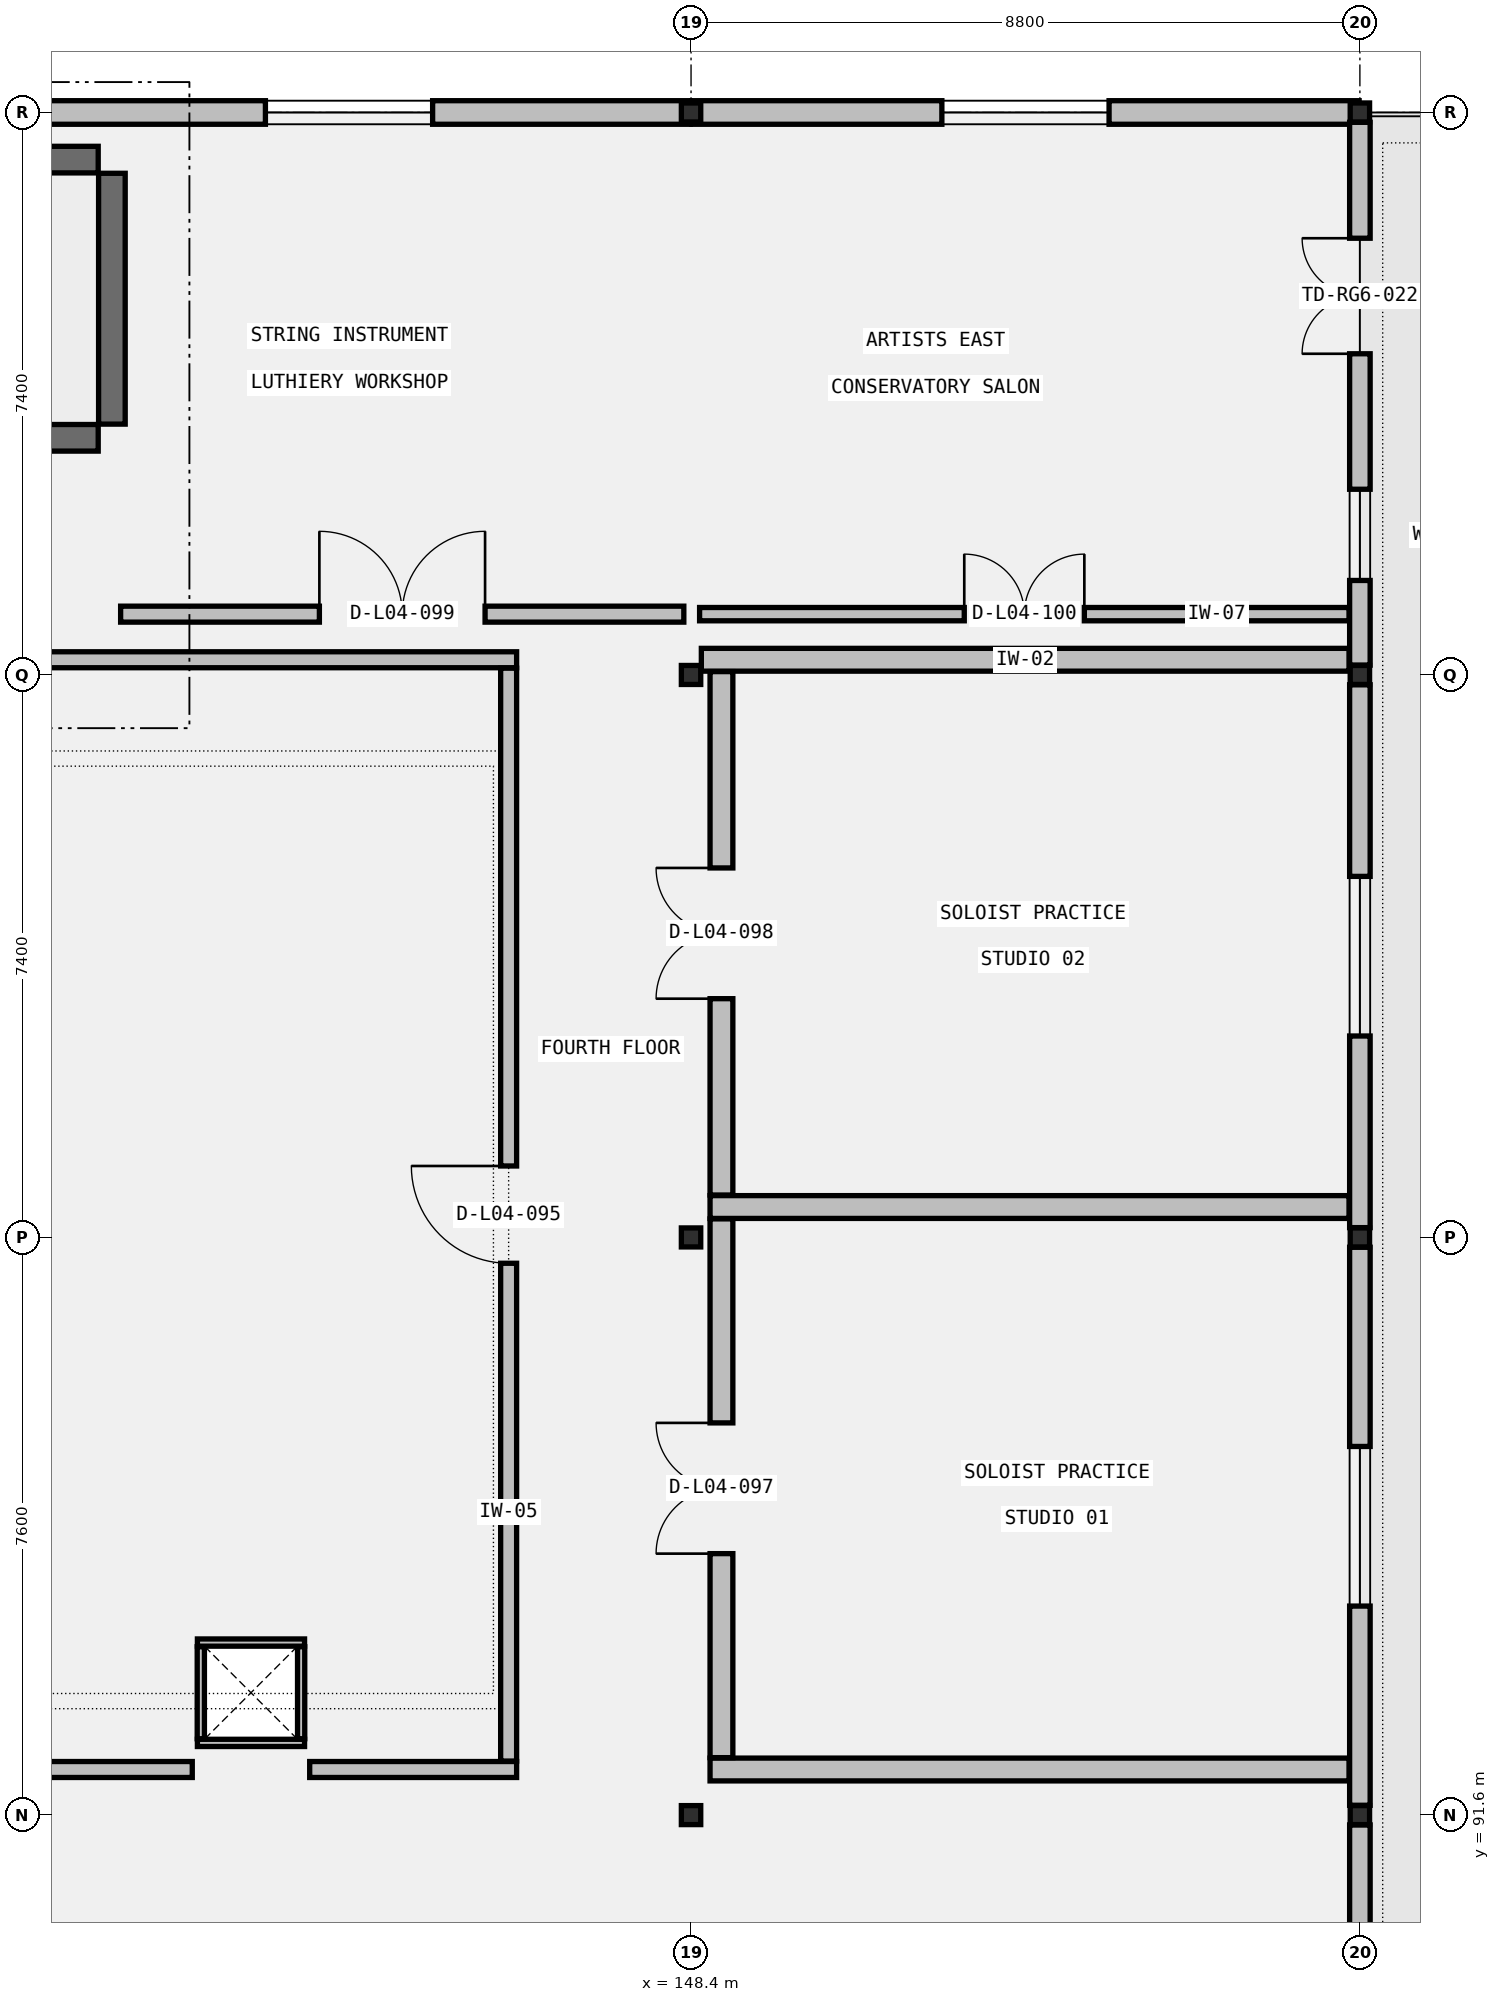
"""IFC4 building model, lengths in metres.
Left out: names, types, materials, properties, quantities, classifications, styles, units other than length and angle.
Written with IfcOpenShell. Run it as: python <this file> out.ifc"""

import sys

from ifc_helpers import new_model, si_unit, direction, frame, frame_2d, origin, origin_2d, place, context, subcontext, project, spatial, rectangle, i_section, extrude, element, fill, save


model = new_model("IFC4")
c1 = context("Model", 3, precision=1e-05, world=origin(), true_north=direction((0.0, 1.0)))
c2 = subcontext(c1, "Body", "Model", "MODEL_VIEW")
j1 = project(units=[si_unit("LENGTHUNIT", "METRE"), si_unit("PLANEANGLEUNIT", "RADIAN")], contexts=[c1])
p1 = place(None, origin())
s1 = spatial("IfcSite", under=j1, at=p1, CompositionType="ELEMENT")
p2 = place(p1, origin())
s2 = spatial("IfcBuilding", under=s1, at=p2, CompositionType="ELEMENT")
p3 = place(p2, frame((0.0, 0.0, 19.2)))
s3 = spatial("IfcBuildingStorey", under=s2, at=p3, CompositionType="ELEMENT", Elevation=19.2)
for number, where, z_axis, x_axis in (
    (1, (148.4, 91.6, 0.0), (0.0, 0.0, 1.0), (1.0, 0.0, 0.0)),
    (2, (148.4, 99.2, 0.0), (0.0, 0.0, 1.0), (1.0, 0.0, 0.0)),
    (3, (148.4, 106.6, 0.0), (0.0, 0.0, 1.0), (1.0, 0.0, 0.0)),
    (4, (148.4, 114.0, 0.0), (0.0, 0.0, 1.0), (1.0, 0.0, 0.0)),
    (5, (157.2, 91.6, 0.0), (0.0, 0.0, 1.0), (1.0, 0.0, 0.0)),
    (6, (157.2, 99.2, 0.0), (0.0, 0.0, 1.0), (1.0, 0.0, 0.0)),
    (7, (157.2, 106.6, 0.0), (0.0, 0.0, 1.0), (1.0, 0.0, 0.0)),
    (8, (157.2, 114.0, 0.0), (0.0, 0.0, 1.0), (1.0, 0.0, 0.0)),
):
    element("IfcColumn", number, at=place(p3, frame(where, z_axis=z_axis, x_axis=x_axis)), inside=s3, PredefinedType="COLUMN", context=c2, shape_type="SweptSolid", body=[
        extrude(i_section(OverallWidth=0.255, OverallDepth=0.25, WebThickness=0.014, FlangeThickness=0.014, FilletRadius=0.016, at=origin_2d()), origin(), (0.0, 0.0, 1.0), 4.6),
    ])
p4 = place(p3, frame((132.45, 109.72, 0.0), z_axis=(0.0, 0.0, 1.0), x_axis=(1.0, 0.0, 0.0)))
e9 = element("IfcWall", 9, at=p4, inside=s3, PredefinedType="SHEAR", context=c2, shape_type="SweptSolid", body=[
    extrude(rectangle(XDim=8.15, YDim=0.35, at=frame_2d((4.075, 0.0))), origin(), (0.0, 0.0, 1.0), 4.34),
])
p5 = place(p3, frame((140.78, 109.9, 0.0), z_axis=(0.0, 0.0, 1.0), x_axis=(0.0, 1.0, 0.0)))
e10 = element("IfcWall", 10, at=p5, inside=s3, PredefinedType="SHEAR", context=c2, shape_type="SweptSolid", body=[
    extrude(rectangle(XDim=3.3, YDim=0.35, at=frame_2d((1.65, 0.0))), origin(), (0.0, 0.0, 1.0), 4.34),
])
p6 = place(p3, frame((140.6, 113.38, 0.0), z_axis=(0.0, 0.0, 1.0), x_axis=(-1.0, 0.0, 0.0)))
e11 = element("IfcWall", 11, at=p6, inside=s3, PredefinedType="SHEAR", context=c2, shape_type="SweptSolid", body=[
    extrude(rectangle(XDim=8.15, YDim=0.35, at=frame_2d((4.075, 0.0))), origin(), (0.0, 0.0, 1.0), 4.34),
])
p7 = place(p3, frame((139.41, 114.0, 0.0), z_axis=(0.0, 0.0, 1.0), x_axis=(1.0, 0.0, 0.0)))
e12 = element("IfcWall", 12, at=p7, inside=s3, PredefinedType="STANDARD", context=c2, shape_type="SweptSolid", body=[
    extrude(rectangle(XDim=8.98, YDim=0.31, at=frame_2d((4.49, 0.0))), origin(), (0.0, 0.0, 1.0), 3.878),
])
p8 = place(p7, frame((3.39, 0.0, 0.9)))
e13 = element("IfcOpeningElement", 13, at=p8, cuts=e12, PredefinedType="OPENING", context=c2, shape_type="SweptSolid", body=[
    extrude(rectangle(XDim=2.2, YDim=1.4, at=frame_2d((1.1, 0.7))), frame((0.0, 0.165, 0.0), z_axis=(0.0, -1.0, 0.0), x_axis=(1.0, 0.0, 0.0)), (0.0, 0.0, 1.0), 0.33),
])
p9 = place(p3, frame((148.41, 114.0, 0.0), z_axis=(0.0, 0.0, 1.0), x_axis=(1.0, 0.0, 0.0)))
e14 = element("IfcWall", 14, at=p9, inside=s3, PredefinedType="STANDARD", context=c2, shape_type="SweptSolid", body=[
    extrude(rectangle(XDim=8.78, YDim=0.31, at=frame_2d((4.39, 0.0))), origin(), (0.0, 0.0, 1.0), 3.878),
])
p10 = place(p9, frame((3.29, 0.0, 0.9)))
e15 = element("IfcOpeningElement", 15, at=p10, cuts=e14, PredefinedType="OPENING", context=c2, shape_type="SweptSolid", body=[
    extrude(rectangle(XDim=2.2, YDim=1.4, at=frame_2d((1.1, 0.7))), frame((0.0, 0.165, 0.0), z_axis=(0.0, -1.0, 0.0), x_axis=(1.0, 0.0, 0.0)), (0.0, 0.0, 1.0), 0.33),
])
p11 = place(p3, frame((157.2, 84.129, 0.0), z_axis=(0.0, 0.0, 1.0), x_axis=(0.0, 1.0, 0.0)))
e16 = element("IfcWall", 16, at=p11, inside=s3, PredefinedType="STANDARD", context=c2, shape_type="SweptSolid", body=[
    extrude(rectangle(XDim=7.342, YDim=0.27, at=frame_2d((3.671, 0.0))), origin(), (0.0, 0.0, 1.0), 3.878),
])
p12 = place(p11, frame((2.621, 0.0, 0.9)))
e17 = element("IfcOpeningElement", 17, at=p12, cuts=e16, PredefinedType="OPENING", context=c2, shape_type="SweptSolid", body=[
    extrude(rectangle(XDim=2.1, YDim=1.8, at=frame_2d((1.05, 0.9))), frame((0.0, 0.145, 0.0), z_axis=(0.0, -1.0, 0.0), x_axis=(1.0, 0.0, 0.0)), (0.0, 0.0, 1.0), 0.29),
])
p13 = place(p3, frame((157.2, 91.729, 0.0), z_axis=(0.0, 0.0, 1.0), x_axis=(0.0, 1.0, 0.0)))
e18 = element("IfcWall", 18, at=p13, inside=s3, PredefinedType="STANDARD", context=c2, shape_type="SweptSolid", body=[
    extrude(rectangle(XDim=7.342, YDim=0.27, at=frame_2d((3.671, 0.0))), origin(), (0.0, 0.0, 1.0), 3.878),
])
p14 = place(p13, frame((2.621, 0.0, 0.9)))
e19 = element("IfcOpeningElement", 19, at=p14, cuts=e18, PredefinedType="OPENING", context=c2, shape_type="SweptSolid", body=[
    extrude(rectangle(XDim=2.1, YDim=1.8, at=frame_2d((1.05, 0.9))), frame((0.0, 0.145, 0.0), z_axis=(0.0, -1.0, 0.0), x_axis=(1.0, 0.0, 0.0)), (0.0, 0.0, 1.0), 0.29),
])
p15 = place(p3, frame((157.2, 99.329, 0.0), z_axis=(0.0, 0.0, 1.0), x_axis=(0.0, 1.0, 0.0)))
e20 = element("IfcWall", 20, at=p15, inside=s3, PredefinedType="STANDARD", context=c2, shape_type="SweptSolid", body=[
    extrude(rectangle(XDim=7.142, YDim=0.27, at=frame_2d((3.571, 0.0))), origin(), (0.0, 0.0, 1.0), 3.878),
])
p16 = place(p15, frame((2.521, 0.0, 0.9)))
e21 = element("IfcOpeningElement", 21, at=p16, cuts=e20, PredefinedType="OPENING", context=c2, shape_type="SweptSolid", body=[
    extrude(rectangle(XDim=2.1, YDim=1.8, at=frame_2d((1.05, 0.9))), frame((0.0, 0.145, 0.0), z_axis=(0.0, -1.0, 0.0), x_axis=(1.0, 0.0, 0.0)), (0.0, 0.0, 1.0), 0.29),
])
p17 = place(p3, frame((157.2, 106.729, 0.0), z_axis=(0.0, 0.0, 1.0), x_axis=(0.0, 1.0, 0.0)))
e22 = element("IfcWall", 22, at=p17, inside=s3, PredefinedType="STANDARD", context=c2, shape_type="SweptSolid", body=[
    extrude(rectangle(XDim=7.142, YDim=0.27, at=frame_2d((3.571, 0.0))), origin(), (0.0, 0.0, 1.0), 3.878),
])
p18 = place(p17, frame((1.114, 0.0, 0.9)))
e23 = element("IfcOpeningElement", 23, at=p18, cuts=e22, PredefinedType="OPENING", context=c2, shape_type="SweptSolid", body=[
    extrude(rectangle(XDim=1.2, YDim=2.15, at=frame_2d((0.6, 1.075))), frame((0.0, 0.145, 0.0), z_axis=(0.0, -1.0, 0.0), x_axis=(1.0, 0.0, 0.0)), (0.0, 0.0, 1.0), 0.29),
])
p19 = place(p17, frame((4.097, 0.0, 0.0)))
e24 = element("IfcOpeningElement", 24, at=p19, cuts=e22, PredefinedType="OPENING", context=c2, shape_type="SweptSolid", body=[
    extrude(rectangle(XDim=1.52, YDim=2.3, at=frame_2d((0.76, 1.15))), frame((0.0, 0.145, 0.0), z_axis=(0.0, -1.0, 0.0), x_axis=(1.0, 0.0, 0.0)), (0.0, 0.0, 1.0), 0.29),
])
for number, where, z_axis, x_axis in (
    (25, (141.905, 92.55, 0.0), (0.0, 0.0, 1.0), (1.0, 0.0, 0.0)),
    (26, (141.905, 93.87, 0.0), (0.0, 0.0, 1.0), (1.0, 0.0, 0.0)),
):
    element("IfcWall", number, at=place(p3, frame(where, z_axis=z_axis, x_axis=x_axis)), inside=s3, PredefinedType="PARTITIONING", context=c2, shape_type="SweptSolid", body=[
        extrude(rectangle(XDim=1.41, YDim=0.095, at=frame_2d((0.705, 0.0))), origin(), (0.0, 0.0, 1.0), 4.34),
    ])
for number, where, z_axis, x_axis in (
    (27, (141.95, 92.605, 0.0), (0.0, 0.0, 1.0), (0.0, 1.0, 0.0)),
    (28, (143.27, 92.605, 0.0), (0.0, 0.0, 1.0), (0.0, 1.0, 0.0)),
):
    element("IfcWall", number, at=place(p3, frame(where, z_axis=z_axis, x_axis=x_axis)), inside=s3, PredefinedType="PARTITIONING", context=c2, shape_type="SweptSolid", body=[
        extrude(rectangle(XDim=1.21, YDim=0.095, at=frame_2d((0.605, 0.0))), origin(), (0.0, 0.0, 1.0), 4.34),
    ])
p20 = place(p3, frame((131.095, 92.2, 0.0), z_axis=(0.0, 0.0, 1.0), x_axis=(1.0, 0.0, 0.0)))
e29 = element("IfcWall", 29, at=p20, inside=s3, PredefinedType="PARTITIONING", context=c2, shape_type="SweptSolid", body=[
    extrude(rectangle(XDim=10.742, YDim=0.21, at=frame_2d((5.371, 0.0))), origin(), (0.0, 0.0, 1.0), 3.968),
])
p21 = place(p3, frame((143.383, 92.2, 0.0), z_axis=(0.0, 0.0, 1.0), x_axis=(1.0, 0.0, 0.0)))
e30 = element("IfcWall", 30, at=p21, inside=s3, PredefinedType="PARTITIONING", context=c2, shape_type="SweptSolid", body=[
    extrude(rectangle(XDim=2.722, YDim=0.21, at=frame_2d((1.361, 0.0))), origin(), (0.0, 0.0, 1.0), 3.968),
])
p22 = place(p3, frame((139.533, 106.8, 0.0), z_axis=(0.0, 0.0, 1.0), x_axis=(1.0, 0.0, 0.0)))
e31 = element("IfcWall", 31, at=p22, inside=s3, PredefinedType="PARTITIONING", context=c2, shape_type="SweptSolid", body=[
    extrude(rectangle(XDim=6.572, YDim=0.21, at=frame_2d((3.286, 0.0))), origin(), (0.0, 0.0, 1.0), 3.878),
])
p23 = place(p3, frame((146.0, 92.311, 0.0), z_axis=(0.0, 0.0, 1.0), x_axis=(0.0, 1.0, 0.0)))
e32 = element("IfcWall", 32, at=p23, inside=s3, PredefinedType="PARTITIONING", context=c2, shape_type="SweptSolid", body=[
    extrude(rectangle(XDim=14.378, YDim=0.21, at=frame_2d((7.189, 0.0))), origin(), (0.0, 0.0, 1.0), 3.878),
])
p24 = place(p23, frame((6.549, 0.0, 0.0)))
e33 = element("IfcOpeningElement", 33, at=p24, cuts=e32, PredefinedType="OPENING", context=c2, shape_type="SweptSolid", body=[
    extrude(rectangle(XDim=1.28, YDim=2.22, at=frame_2d((0.64, 1.11))), frame((0.0, 0.115, 0.0), z_axis=(0.0, -1.0, 0.0), x_axis=(1.0, 0.0, 0.0)), (0.0, 0.0, 1.0), 0.23),
])
for number, where, z_axis, x_axis in (
    (34, (148.65, 92.2, 0.0), (0.0, 0.0, 1.0), (1.0, 0.0, 0.0)),
    (35, (148.65, 99.6, 0.0), (0.0, 0.0, 1.0), (1.0, 0.0, 0.0)),
):
    element("IfcWall", number, at=place(p3, frame(where, z_axis=z_axis, x_axis=x_axis)), inside=s3, PredefinedType="PARTITIONING", context=c2, shape_type="SweptSolid", body=[
        extrude(rectangle(XDim=8.407, YDim=0.3, at=frame_2d((4.204, 0.0))), origin(), (0.0, 0.0, 1.0), 3.978),
    ])
p25 = place(p3, frame((148.8, 92.356, 0.0), z_axis=(0.0, 0.0, 1.0), x_axis=(0.0, 1.0, 0.0)))
e36 = element("IfcWall", 36, at=p25, inside=s3, PredefinedType="PARTITIONING", context=c2, shape_type="SweptSolid", body=[
    extrude(rectangle(XDim=7.088, YDim=0.3, at=frame_2d((3.544, 0.0))), origin(), (0.0, 0.0, 1.0), 3.878),
])
p26 = place(p25, frame((2.684, 0.0, 0.0)))
e37 = element("IfcOpeningElement", 37, at=p26, cuts=e36, PredefinedType="OPENING", context=c2, shape_type="SweptSolid", body=[
    extrude(rectangle(XDim=1.72, YDim=2.38, at=frame_2d((0.86, 1.19))), frame((0.0, 0.16, 0.0), z_axis=(0.0, -1.0, 0.0), x_axis=(1.0, 0.0, 0.0)), (0.0, 0.0, 1.0), 0.32),
])
p27 = place(p3, frame((148.535, 106.8, 0.0), z_axis=(0.0, 0.0, 1.0), x_axis=(1.0, 0.0, 0.0)))
e38 = element("IfcWall", 38, at=p27, inside=s3, PredefinedType="PARTITIONING", context=c2, shape_type="SweptSolid", body=[
    extrude(rectangle(XDim=8.521, YDim=0.3, at=frame_2d((4.261, 0.0))), origin(), (0.0, 0.0, 1.0), 3.878),
])
p28 = place(p3, frame((148.8, 99.758, 0.0), z_axis=(0.0, 0.0, 1.0), x_axis=(0.0, 1.0, 0.0)))
e39 = element("IfcWall", 39, at=p28, inside=s3, PredefinedType="PARTITIONING", context=c2, shape_type="SweptSolid", body=[
    extrude(rectangle(XDim=6.886, YDim=0.3, at=frame_2d((3.443, 0.0))), origin(), (0.0, 0.0, 1.0), 3.878),
])
p29 = place(p28, frame((2.583, 0.0, 0.0)))
e40 = element("IfcOpeningElement", 40, at=p29, cuts=e39, PredefinedType="OPENING", context=c2, shape_type="SweptSolid", body=[
    extrude(rectangle(XDim=1.72, YDim=2.38, at=frame_2d((0.86, 1.19))), frame((0.0, 0.16, 0.0), z_axis=(0.0, -1.0, 0.0), x_axis=(1.0, 0.0, 0.0)), (0.0, 0.0, 1.0), 0.32),
])
p30 = place(p3, frame((140.895, 107.4, 0.0), z_axis=(0.0, 0.0, 1.0), x_axis=(1.0, 0.0, 0.0)))
e41 = element("IfcWall", 41, at=p30, inside=s3, PredefinedType="PARTITIONING", context=c2, shape_type="SweptSolid", body=[
    extrude(rectangle(XDim=7.41, YDim=0.21, at=frame_2d((3.705, 0.0))), origin(), (0.0, 0.0, 1.0), 3.968),
])
p31 = place(p30, frame((2.615, 0.0, 0.0)))
e42 = element("IfcOpeningElement", 42, at=p31, cuts=e41, PredefinedType="OPENING", context=c2, shape_type="SweptSolid", body=[
    extrude(rectangle(XDim=2.18, YDim=2.58, at=frame_2d((1.09, 1.29))), frame((0.0, 0.115, 0.0), z_axis=(0.0, -1.0, 0.0), x_axis=(1.0, 0.0, 0.0)), (0.0, 0.0, 1.0), 0.23),
])
p32 = place(p3, frame((148.512, 107.4, 0.0), z_axis=(0.0, 0.0, 1.0), x_axis=(1.0, 0.0, 0.0)))
e43 = element("IfcWall", 43, at=p32, inside=s3, PredefinedType="PARTITIONING", context=c2, shape_type="SweptSolid", body=[
    extrude(rectangle(XDim=8.544, YDim=0.175, at=frame_2d((4.272, 0.0))), origin(), (0.0, 0.0, 1.0), 3.978),
])
p33 = place(p32, frame((3.482, 0.0, 0.0)))
e44 = element("IfcOpeningElement", 44, at=p33, cuts=e43, PredefinedType="OPENING", context=c2, shape_type="SweptSolid", body=[
    extrude(rectangle(XDim=1.58, YDim=2.28, at=frame_2d((0.79, 1.14))), frame((0.0, 0.097, 0.0), z_axis=(0.0, -1.0, 0.0), x_axis=(1.0, 0.0, 0.0)), (0.0, 0.0, 1.0), 0.195),
])
p34 = place(p8, origin())
e45 = element("IfcWindow", 45, at=p34, inside=s3, PartitioningType="DOUBLE_PANEL_VERTICAL", PredefinedType="WINDOW", context=c2, shape_type="SweptSolid", body=[
    extrude(rectangle(XDim=2.2, YDim=1.4, at=frame_2d((1.1, 0.7))), frame((0.0, 0.03, 0.0), z_axis=(0.0, -1.0, 0.0), x_axis=(1.0, 0.0, 0.0)), (0.0, 0.0, 1.0), 0.06),
])
fill(e13, e45)
p35 = place(p10, origin())
e46 = element("IfcWindow", 46, at=p35, inside=s3, PartitioningType="DOUBLE_PANEL_VERTICAL", PredefinedType="WINDOW", context=c2, shape_type="SweptSolid", body=[
    extrude(rectangle(XDim=2.2, YDim=1.4, at=frame_2d((1.1, 0.7))), frame((0.0, 0.03, 0.0), z_axis=(0.0, -1.0, 0.0), x_axis=(1.0, 0.0, 0.0)), (0.0, 0.0, 1.0), 0.06),
])
fill(e15, e46)
p36 = place(p14, origin())
e47 = element("IfcWindow", 47, at=p36, inside=s3, PartitioningType="DOUBLE_PANEL_VERTICAL", PredefinedType="WINDOW", context=c2, shape_type="SweptSolid", body=[
    extrude(rectangle(XDim=2.1, YDim=1.8, at=frame_2d((1.05, 0.9))), frame((0.0, 0.03, 0.0), z_axis=(0.0, -1.0, 0.0), x_axis=(1.0, 0.0, 0.0)), (0.0, 0.0, 1.0), 0.06),
])
fill(e19, e47)
p37 = place(p16, origin())
e48 = element("IfcWindow", 48, at=p37, inside=s3, PartitioningType="DOUBLE_PANEL_VERTICAL", PredefinedType="WINDOW", context=c2, shape_type="SweptSolid", body=[
    extrude(rectangle(XDim=2.1, YDim=1.8, at=frame_2d((1.05, 0.9))), frame((0.0, 0.03, 0.0), z_axis=(0.0, -1.0, 0.0), x_axis=(1.0, 0.0, 0.0)), (0.0, 0.0, 1.0), 0.06),
])
fill(e21, e48)
p38 = place(p18, origin())
e49 = element("IfcWindow", 49, at=p38, inside=s3, PartitioningType="SINGLE_PANEL", PredefinedType="WINDOW", context=c2, shape_type="SweptSolid", body=[
    extrude(rectangle(XDim=1.2, YDim=2.15, at=frame_2d((0.6, 1.075))), frame((0.0, 0.03, 0.0), z_axis=(0.0, -1.0, 0.0), x_axis=(1.0, 0.0, 0.0)), (0.0, 0.0, 1.0), 0.06),
])
fill(e23, e49)
p39 = place(p19, origin())
e50 = element("IfcDoor", 50, at=p39, inside=s3, OperationType="DOUBLE_DOOR_SINGLE_SWING", PredefinedType="DOOR", context=c2, shape_type="SweptSolid", body=[
    extrude(rectangle(XDim=1.52, YDim=2.3, at=frame_2d((0.76, 1.15))), frame((0.0, 0.025, 0.0), z_axis=(0.0, -1.0, 0.0), x_axis=(1.0, 0.0, 0.0)), (0.0, 0.0, 1.0), 0.05),
])
fill(e24, e50)
p40 = place(p24, origin())
e51 = element("IfcDoor", 51, at=p40, inside=s3, OperationType="SINGLE_SWING_RIGHT", PredefinedType="DOOR", context=c2, shape_type="SweptSolid", body=[
    extrude(rectangle(XDim=1.28, YDim=2.22, at=frame_2d((0.64, 1.11))), frame((0.0, 0.025, 0.0), z_axis=(0.0, -1.0, 0.0), x_axis=(1.0, 0.0, 0.0)), (0.0, 0.0, 1.0), 0.05),
])
fill(e33, e51)
p41 = place(p26, origin())
e52 = element("IfcDoor", 52, at=p41, inside=s3, OperationType="DOUBLE_DOOR_SINGLE_SWING", PredefinedType="DOOR", context=c2, shape_type="SweptSolid", body=[
    extrude(rectangle(XDim=1.72, YDim=2.38, at=frame_2d((0.86, 1.19))), frame((0.0, 0.025, 0.0), z_axis=(0.0, -1.0, 0.0), x_axis=(1.0, 0.0, 0.0)), (0.0, 0.0, 1.0), 0.05),
])
fill(e37, e52)
p42 = place(p29, origin())
e53 = element("IfcDoor", 53, at=p42, inside=s3, OperationType="DOUBLE_DOOR_SINGLE_SWING", PredefinedType="DOOR", context=c2, shape_type="SweptSolid", body=[
    extrude(rectangle(XDim=1.72, YDim=2.38, at=frame_2d((0.86, 1.19))), frame((0.0, 0.025, 0.0), z_axis=(0.0, -1.0, 0.0), x_axis=(1.0, 0.0, 0.0)), (0.0, 0.0, 1.0), 0.05),
])
fill(e40, e53)
p43 = place(p31, origin())
e54 = element("IfcDoor", 54, at=p43, inside=s3, OperationType="DOUBLE_DOOR_SINGLE_SWING", PredefinedType="DOOR", context=c2, shape_type="SweptSolid", body=[
    extrude(rectangle(XDim=2.18, YDim=2.58, at=frame_2d((1.09, 1.29))), frame((0.0, 0.025, 0.0), z_axis=(0.0, -1.0, 0.0), x_axis=(1.0, 0.0, 0.0)), (0.0, 0.0, 1.0), 0.05),
])
fill(e42, e54)
p44 = place(p33, origin())
e55 = element("IfcDoor", 55, at=p44, inside=s3, OperationType="DOUBLE_DOOR_SINGLE_SWING", PredefinedType="DOOR", context=c2, shape_type="SweptSolid", body=[
    extrude(rectangle(XDim=1.58, YDim=2.28, at=frame_2d((0.79, 1.14))), frame((0.0, 0.025, 0.0), z_axis=(0.0, -1.0, 0.0), x_axis=(1.0, 0.0, 0.0)), (0.0, 0.0, 1.0), 0.05),
])
fill(e44, e55)
save(model, sys.argv[1])
